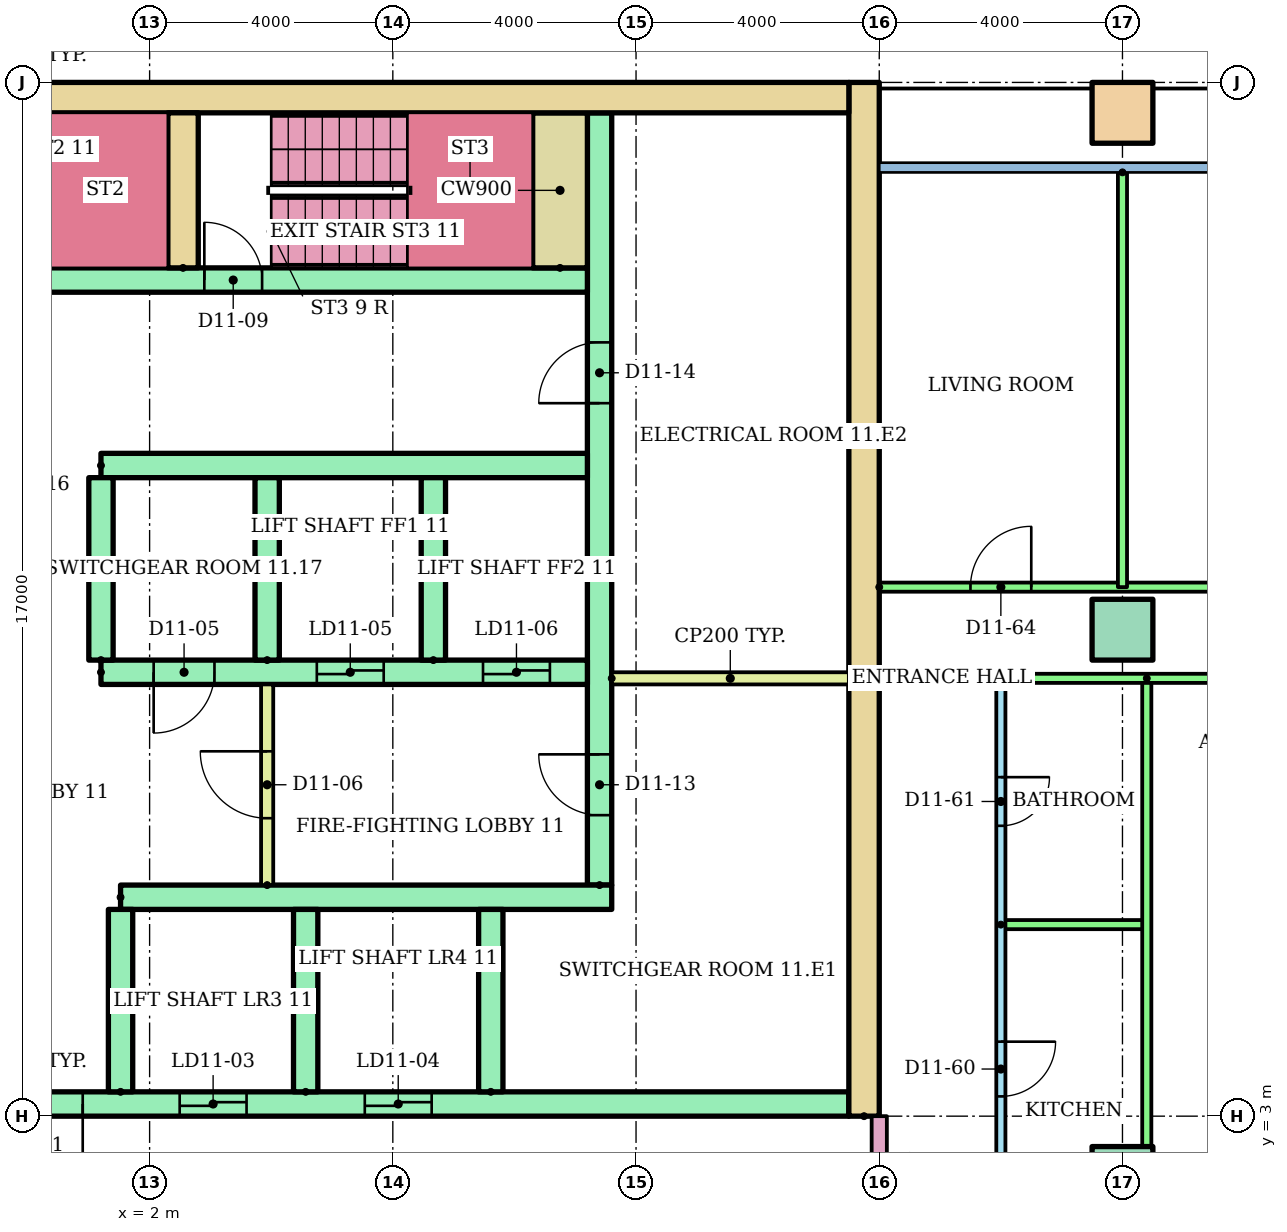
"""IFC4 building model, lengths in metres.
Left out: names, types, materials, properties, quantities, classifications, styles, units other than length and angle.
Written with IfcOpenShell. Run it as: python <this file> out.ifc"""

import sys

from ifc_helpers import new_model, si_unit, direction, frame, frame_2d, origin, origin_2d, place, context, subcontext, project, spatial, rectangle, hollow_rectangle, extrude, element, fill, save


model = new_model("IFC4")
c1 = context("Model", 3, precision=1e-05, world=origin(), true_north=direction((0.0, 1.0)))
c2 = subcontext(c1, "Body", "Model", "MODEL_VIEW")
j1 = project(units=[si_unit("LENGTHUNIT", "METRE"), si_unit("PLANEANGLEUNIT", "RADIAN")], contexts=[c1])
p1 = place(None, origin())
s1 = spatial("IfcSite", under=j1, at=p1, CompositionType="ELEMENT")
p2 = place(p1, origin())
s2 = spatial("IfcBuilding", under=s1, at=p2, CompositionType="ELEMENT")
p3 = place(p2, frame((0.0, 0.0, 44.8)))
s3 = spatial("IfcBuildingStorey", under=s2, at=p3, CompositionType="ELEMENT", Elevation=44.8)
for number, where in (
    (1, (18.0, 2.0, 0.0)),
    (2, (18.0, 11.0, 0.0)),
):
    element("IfcColumn", number, at=place(p3, frame(where)), inside=s3, PredefinedType="COLUMN", context=c2, shape_type="SweptSolid", body=[
        extrude(rectangle(XDim=1.0, YDim=1.0, at=origin_2d()), origin(), (0.0, 0.0, 1.0), 3.2),
    ])
p4 = place(p3, frame((18.0, 19.5, 0.0)))
e3 = element("IfcColumn", 3, at=p4, inside=s3, PredefinedType="COLUMN", context=c2, shape_type="SweptSolid", body=[
    extrude(hollow_rectangle(XDim=1.0, YDim=1.0, WallThickness=0.05, at=origin_2d()), origin(), (0.0, 0.0, 1.0), 3.2),
])
p5 = place(p3, frame((13.75, 3.0, 0.0), z_axis=(0.0, 0.0, 1.0), x_axis=(0.0, 1.0, 0.0)))
e4 = element("IfcWall", 4, at=p5, inside=s3, PredefinedType="SHEAR", context=c2, shape_type="SweptSolid", body=[
    extrude(rectangle(XDim=17.0, YDim=0.5, at=frame_2d((8.5, 0.0))), origin(), (0.0, 0.0, 1.0), 2.92),
])
p6 = place(p3, frame((-13.5, 19.75, 0.0)))
e5 = element("IfcWall", 5, at=p6, inside=s3, PredefinedType="SHEAR", context=c2, shape_type="SweptSolid", body=[
    extrude(rectangle(XDim=27.0, YDim=0.5, at=frame_2d((13.5, 0.0))), origin(), (0.0, 0.0, 1.0), 2.92),
])
p7 = place(p3, frame((9.4, 6.8, 0.0), z_axis=(0.0, 0.0, 1.0), x_axis=(0.0, 1.0, 0.0)))
e6 = element("IfcWall", 6, at=p7, inside=s3, PredefinedType="SHEAR", context=c2, shape_type="SweptSolid", body=[
    extrude(rectangle(XDim=12.7, YDim=0.4, at=frame_2d((6.35, 0.0))), origin(), (0.0, 0.0, 1.0), 2.92),
])
p8 = place(p7, frame((1.15, 0.0, 0.0)))
e7 = element("IfcOpeningElement", 7, at=p8, cuts=e6, PredefinedType="OPENING", context=c2, shape_type="SweptSolid", body=[
    extrude(rectangle(XDim=1.0, YDim=2.1, at=frame_2d((0.5, 1.05))), frame((0.0, 0.21, 0.0), z_axis=(0.0, -1.0, 0.0), x_axis=(1.0, 0.0, 0.0)), (0.0, 0.0, 1.0), 0.42),
])
p9 = place(p7, frame((7.925, 0.0, 0.0)))
e8 = element("IfcOpeningElement", 8, at=p9, cuts=e6, PredefinedType="OPENING", context=c2, shape_type="SweptSolid", body=[
    extrude(rectangle(XDim=1.0, YDim=2.1, at=frame_2d((0.5, 1.05))), frame((0.0, 0.21, 0.0), z_axis=(0.0, -1.0, 0.0), x_axis=(1.0, 0.0, 0.0)), (0.0, 0.0, 1.0), 0.42),
])
p10 = place(p3, frame((-13.5, 3.2, 0.0)))
e9 = element("IfcWall", 9, at=p10, inside=s3, PredefinedType="SHEAR", context=c2, shape_type="SweptSolid", body=[
    extrude(rectangle(XDim=27.0, YDim=0.4, at=frame_2d((13.5, 0.0))), origin(), (0.0, 0.0, 1.0), 2.92),
])
p11 = place(p10, frame((6.861, 0.0, 0.0)))
e10 = element("IfcOpeningElement", 10, at=p11, cuts=e9, PredefinedType="OPENING", context=c2, shape_type="SweptSolid", body=[
    extrude(rectangle(XDim=1.1, YDim=2.1, at=frame_2d((0.55, 1.05))), frame((0.0, 0.21, 0.0), z_axis=(0.0, -1.0, 0.0), x_axis=(1.0, 0.0, 0.0)), (0.0, 0.0, 1.0), 0.42),
])
p12 = place(p10, frame((9.906, 0.0, 0.0)))
e11 = element("IfcOpeningElement", 11, at=p12, cuts=e9, PredefinedType="OPENING", context=c2, shape_type="SweptSolid", body=[
    extrude(rectangle(XDim=1.1, YDim=2.1, at=frame_2d((0.55, 1.05))), frame((0.0, 0.21, 0.0), z_axis=(0.0, -1.0, 0.0), x_axis=(1.0, 0.0, 0.0)), (0.0, 0.0, 1.0), 0.42),
])
p13 = place(p10, frame((15.994, 0.0, 0.0)))
e12 = element("IfcOpeningElement", 12, at=p13, cuts=e9, PredefinedType="OPENING", context=c2, shape_type="SweptSolid", body=[
    extrude(rectangle(XDim=1.1, YDim=2.1, at=frame_2d((0.55, 1.05))), frame((0.0, 0.21, 0.0), z_axis=(0.0, -1.0, 0.0), x_axis=(1.0, 0.0, 0.0)), (0.0, 0.0, 1.0), 0.42),
])
p14 = place(p10, frame((19.039, 0.0, 0.0)))
e13 = element("IfcOpeningElement", 13, at=p14, cuts=e9, PredefinedType="OPENING", context=c2, shape_type="SweptSolid", body=[
    extrude(rectangle(XDim=1.1, YDim=2.1, at=frame_2d((0.55, 1.05))), frame((0.0, 0.21, 0.0), z_axis=(0.0, -1.0, 0.0), x_axis=(1.0, 0.0, 0.0)), (0.0, 0.0, 1.0), 0.42),
])
p15 = place(p10, frame((12.6, 0.0, 0.0)))
e14 = element("IfcOpeningElement", 14, at=p15, cuts=e9, PredefinedType="OPENING", context=c2, shape_type="SweptSolid", body=[
    extrude(rectangle(XDim=1.8, YDim=2.1, at=frame_2d((0.9, 1.05))), frame((0.0, 0.21, 0.0), z_axis=(0.0, -1.0, 0.0), x_axis=(1.0, 0.0, 0.0)), (0.0, 0.0, 1.0), 0.42),
])
p16 = place(p3, frame((1.522, 6.6, 0.0)))
e15 = element("IfcWall", 15, at=p16, inside=s3, PredefinedType="SHEAR", context=c2, shape_type="SweptSolid", body=[
    extrude(rectangle(XDim=8.078, YDim=0.4, at=frame_2d((4.039, 0.0))), origin(), (0.0, 0.0, 1.0), 2.92),
])
for number, where, z_axis, x_axis in (
    (16, (1.522, 3.4, 0.0), (0.0, 0.0, 1.0), (0.0, 1.0, 0.0)),
    (17, (4.567, 3.4, 0.0), (0.0, 0.0, 1.0), (0.0, 1.0, 0.0)),
    (18, (7.611, 3.4, 0.0), (0.0, 0.0, 1.0), (0.0, 1.0, 0.0)),
):
    element("IfcWall", number, at=place(p3, frame(where, z_axis=z_axis, x_axis=x_axis)), inside=s3, PredefinedType="SHEAR", context=c2, shape_type="SweptSolid", body=[
        extrude(rectangle(XDim=3.0, YDim=0.4, at=frame_2d((1.5, 0.0))), origin(), (0.0, 0.0, 1.0), 2.92),
    ])
p17 = place(p3, frame((1.2, 10.3, 0.0)))
e19 = element("IfcWall", 19, at=p17, inside=s3, PredefinedType="SHEAR", context=c2, shape_type="SweptSolid", body=[
    extrude(rectangle(XDim=8.0, YDim=0.4, at=frame_2d((4.0, 0.0))), origin(), (0.0, 0.0, 1.0), 2.92),
])
p18 = place(p17, frame((3.55, 0.0, 0.0)))
e20 = element("IfcOpeningElement", 20, at=p18, cuts=e19, PredefinedType="OPENING", context=c2, shape_type="SweptSolid", body=[
    extrude(rectangle(XDim=1.1, YDim=2.1, at=frame_2d((0.55, 1.05))), frame((0.0, 0.21, 0.0), z_axis=(0.0, -1.0, 0.0), x_axis=(1.0, 0.0, 0.0)), (0.0, 0.0, 1.0), 0.42),
])
p19 = place(p17, frame((6.283, 0.0, 0.0)))
e21 = element("IfcOpeningElement", 21, at=p19, cuts=e19, PredefinedType="OPENING", context=c2, shape_type="SweptSolid", body=[
    extrude(rectangle(XDim=1.1, YDim=2.1, at=frame_2d((0.55, 1.05))), frame((0.0, 0.21, 0.0), z_axis=(0.0, -1.0, 0.0), x_axis=(1.0, 0.0, 0.0)), (0.0, 0.0, 1.0), 0.42),
])
p20 = place(p17, frame((0.867, 0.0, 0.0)))
e22 = element("IfcOpeningElement", 22, at=p20, cuts=e19, PredefinedType="OPENING", context=c2, shape_type="SweptSolid", body=[
    extrude(rectangle(XDim=1.0, YDim=2.1, at=frame_2d((0.5, 1.05))), frame((0.0, 0.21, 0.0), z_axis=(0.0, -1.0, 0.0), x_axis=(1.0, 0.0, 0.0)), (0.0, 0.0, 1.0), 0.42),
])
p21 = place(p3, frame((1.2, 13.7, 0.0)))
e23 = element("IfcWall", 23, at=p21, inside=s3, PredefinedType="SHEAR", context=c2, shape_type="SweptSolid", body=[
    extrude(rectangle(XDim=8.0, YDim=0.4, at=frame_2d((4.0, 0.0))), origin(), (0.0, 0.0, 1.0), 2.92),
])
for number, where, z_axis, x_axis in (
    (24, (1.2, 10.5, 0.0), (0.0, 0.0, 1.0), (0.0, 1.0, 0.0)),
    (25, (3.933, 10.5, 0.0), (0.0, 0.0, 1.0), (0.0, 1.0, 0.0)),
    (26, (6.667, 10.5, 0.0), (0.0, 0.0, 1.0), (0.0, 1.0, 0.0)),
):
    element("IfcWall", number, at=place(p3, frame(where, z_axis=z_axis, x_axis=x_axis)), inside=s3, PredefinedType="SHEAR", context=c2, shape_type="SweptSolid", body=[
        extrude(rectangle(XDim=3.0, YDim=0.4, at=frame_2d((1.5, 0.0))), origin(), (0.0, 0.0, 1.0), 2.92),
    ])
p22 = place(p3, frame((3.933, 6.8, 0.0), z_axis=(0.0, 0.0, 1.0), x_axis=(0.0, 1.0, 0.0)))
e27 = element("IfcWall", 27, at=p22, inside=s3, PredefinedType="PARTITIONING", context=c2, shape_type="SweptSolid", body=[
    extrude(rectangle(XDim=3.3, YDim=0.2, at=frame_2d((1.65, 0.0))), origin(), (0.0, 0.0, 1.0), 2.92),
])
p23 = place(p22, frame((1.1, 0.0, 0.0)))
e28 = element("IfcOpeningElement", 28, at=p23, cuts=e27, PredefinedType="OPENING", context=c2, shape_type="SweptSolid", body=[
    extrude(rectangle(XDim=1.1, YDim=2.1, at=frame_2d((0.55, 1.05))), frame((0.0, 0.11, 0.0), z_axis=(0.0, -1.0, 0.0), x_axis=(1.0, 0.0, 0.0)), (0.0, 0.0, 1.0), 0.22),
])
p24 = place(p3, frame((-9.2, 16.75, 0.0)))
e29 = element("IfcWall", 29, at=p24, inside=s3, PredefinedType="SHEAR", context=c2, shape_type="SweptSolid", body=[
    extrude(rectangle(XDim=18.4, YDim=0.4, at=frame_2d((9.2, 0.0))), origin(), (0.0, 0.0, 1.0), 2.92),
])
p25 = place(p24, frame((0.1, 0.0, 0.0)))
e30 = element("IfcOpeningElement", 30, at=p25, cuts=e29, PredefinedType="OPENING", context=c2, shape_type="SweptSolid", body=[
    extrude(rectangle(XDim=0.95, YDim=2.1, at=frame_2d((0.475, 1.05))), frame((0.0, 0.21, 0.0), z_axis=(0.0, -1.0, 0.0), x_axis=(1.0, 0.0, 0.0)), (0.0, 0.0, 1.0), 0.42),
])
p26 = place(p24, frame((6.1, 0.0, 0.0)))
e31 = element("IfcOpeningElement", 31, at=p26, cuts=e29, PredefinedType="OPENING", context=c2, shape_type="SweptSolid", body=[
    extrude(rectangle(XDim=0.95, YDim=2.1, at=frame_2d((0.475, 1.05))), frame((0.0, 0.21, 0.0), z_axis=(0.0, -1.0, 0.0), x_axis=(1.0, 0.0, 0.0)), (0.0, 0.0, 1.0), 0.42),
])
p27 = place(p24, frame((12.1, 0.0, 0.0)))
e32 = element("IfcOpeningElement", 32, at=p27, cuts=e29, PredefinedType="OPENING", context=c2, shape_type="SweptSolid", body=[
    extrude(rectangle(XDim=0.95, YDim=2.1, at=frame_2d((0.475, 1.05))), frame((0.0, 0.21, 0.0), z_axis=(0.0, -1.0, 0.0), x_axis=(1.0, 0.0, 0.0)), (0.0, 0.0, 1.0), 0.42),
])
p28 = place(p3, frame((2.55, 16.95, 0.0), z_axis=(0.0, 0.0, 1.0), x_axis=(0.0, 1.0, 0.0)))
e33 = element("IfcWall", 33, at=p28, inside=s3, PredefinedType="SHEAR", context=c2, shape_type="SweptSolid", body=[
    extrude(rectangle(XDim=2.55, YDim=0.5, at=frame_2d((1.275, 0.0))), origin(), (0.0, 0.0, 1.0), 2.92),
])
p29 = place(p3, frame((8.75, 16.95, 0.0), z_axis=(0.0, 0.0, 1.0), x_axis=(0.0, 1.0, 0.0)))
e34 = element("IfcWall", 34, at=p29, inside=s3, PredefinedType="SHEAR", context=c2, shape_type="SweptSolid", body=[
    extrude(rectangle(XDim=2.55, YDim=0.9, at=frame_2d((1.275, 0.0))), origin(), (0.0, 0.0, 1.0), 2.92),
])
p30 = place(p3, frame((9.6, 10.2, 0.0)))
e35 = element("IfcWall", 35, at=p30, inside=s3, PredefinedType="PARTITIONING", context=c2, shape_type="SweptSolid", body=[
    extrude(rectangle(XDim=3.9, YDim=0.2, at=frame_2d((1.95, 0.0))), origin(), (0.0, 0.0, 1.0), 2.92),
])
p31 = place(p3, frame((16.0, 10.2, 0.0), z_axis=(0.0, 0.0, 1.0), x_axis=(0.0, -1.0, 0.0)))
e36 = element("IfcWall", 36, at=p31, inside=s3, PredefinedType="PARTITIONING", context=c2, shape_type="SweptSolid", body=[
    extrude(rectangle(XDim=8.8, YDim=0.15, at=frame_2d((4.4, 0.0))), origin(), (0.0, 0.0, 1.0), 2.4),
])
p32 = place(p31, frame((5.975, 0.0, 0.0)))
e37 = element("IfcOpeningElement", 37, at=p32, cuts=e36, PredefinedType="OPENING", context=c2, shape_type="SweptSolid", body=[
    extrude(rectangle(XDim=0.9, YDim=2.1, at=frame_2d((0.45, 1.05))), frame((0.0, 0.085, 0.0), z_axis=(0.0, -1.0, 0.0), x_axis=(1.0, 0.0, 0.0)), (0.0, 0.0, 1.0), 0.17),
])
p33 = place(p31, frame((1.625, 0.0, 0.0)))
e38 = element("IfcOpeningElement", 38, at=p33, cuts=e36, PredefinedType="OPENING", context=c2, shape_type="SweptSolid", body=[
    extrude(rectangle(XDim=0.8, YDim=2.1, at=frame_2d((0.4, 1.05))), frame((0.0, 0.085, 0.0), z_axis=(0.0, -1.0, 0.0), x_axis=(1.0, 0.0, 0.0)), (0.0, 0.0, 1.0), 0.17),
])
p34 = place(p3, frame((16.0, 6.15, 0.0)))
e39 = element("IfcWall", 39, at=p34, inside=s3, PredefinedType="PARTITIONING", context=c2, shape_type="SweptSolid", body=[
    extrude(rectangle(XDim=2.4, YDim=0.15, at=frame_2d((1.2, 0.0))), origin(), (0.0, 0.0, 1.0), 2.4),
])
p35 = place(p3, frame((18.4, 10.2, 0.0), z_axis=(0.0, 0.0, 1.0), x_axis=(0.0, -1.0, 0.0)))
e40 = element("IfcWall", 40, at=p35, inside=s3, PredefinedType="PARTITIONING", context=c2, shape_type="SweptSolid", body=[
    extrude(rectangle(XDim=8.8, YDim=0.15, at=frame_2d((4.4, 0.0))), origin(), (0.0, 0.0, 1.0), 2.4),
])
p36 = place(p3, frame((26.0, 10.2, 0.0), z_axis=(0.0, 0.0, 1.0), x_axis=(-1.0, 0.0, 0.0)))
e41 = element("IfcWall", 41, at=p36, inside=s3, PredefinedType="PARTITIONING", context=c2, shape_type="SweptSolid", body=[
    extrude(rectangle(XDim=10.0, YDim=0.15, at=frame_2d((5.0, 0.0))), origin(), (0.0, 0.0, 1.0), 2.4),
])
p37 = place(p36, frame((4.9, 0.0, 0.0)))
e42 = element("IfcOpeningElement", 42, at=p37, cuts=e41, PredefinedType="OPENING", context=c2, shape_type="SweptSolid", body=[
    extrude(rectangle(XDim=0.9, YDim=2.1, at=frame_2d((0.45, 1.05))), frame((0.0, 0.085, 0.0), z_axis=(0.0, -1.0, 0.0), x_axis=(1.0, 0.0, 0.0)), (0.0, 0.0, 1.0), 0.17),
])
p38 = place(p36, frame((1.1, 0.0, 0.0)))
e43 = element("IfcOpeningElement", 43, at=p38, cuts=e41, PredefinedType="OPENING", context=c2, shape_type="SweptSolid", body=[
    extrude(rectangle(XDim=0.9, YDim=2.1, at=frame_2d((0.45, 1.05))), frame((0.0, 0.085, 0.0), z_axis=(0.0, -1.0, 0.0), x_axis=(1.0, 0.0, 0.0)), (0.0, 0.0, 1.0), 0.17),
])
p39 = place(p3, frame((14.0, 11.7, 0.0)))
e44 = element("IfcWall", 44, at=p39, inside=s3, PredefinedType="PARTITIONING", context=c2, shape_type="SweptSolid", body=[
    extrude(rectangle(XDim=12.0, YDim=0.15, at=frame_2d((6.0, 0.0))), origin(), (0.0, 0.0, 1.0), 2.4),
])
p40 = place(p39, frame((1.5, 0.0, 0.0)))
e45 = element("IfcOpeningElement", 45, at=p40, cuts=e44, PredefinedType="OPENING", context=c2, shape_type="SweptSolid", body=[
    extrude(rectangle(XDim=1.0, YDim=2.1, at=frame_2d((0.5, 1.05))), frame((0.0, 0.085, 0.0), z_axis=(0.0, -1.0, 0.0), x_axis=(1.0, 0.0, 0.0)), (0.0, 0.0, 1.0), 0.17),
])
p41 = place(p39, frame((7.55, 0.0, 0.0)))
e46 = element("IfcOpeningElement", 46, at=p41, cuts=e44, PredefinedType="OPENING", context=c2, shape_type="SweptSolid", body=[
    extrude(rectangle(XDim=0.9, YDim=2.1, at=frame_2d((0.45, 1.05))), frame((0.0, 0.085, 0.0), z_axis=(0.0, -1.0, 0.0), x_axis=(1.0, 0.0, 0.0)), (0.0, 0.0, 1.0), 0.17),
])
p42 = place(p3, frame((18.0, 18.521, 0.0), z_axis=(0.0, 0.0, 1.0), x_axis=(0.0, -1.0, 0.0)))
e47 = element("IfcWall", 47, at=p42, inside=s3, PredefinedType="PARTITIONING", context=c2, shape_type="SweptSolid", body=[
    extrude(rectangle(XDim=6.821, YDim=0.15, at=frame_2d((3.411, 0.0))), origin(), (0.0, 0.0, 1.0), 2.4),
])
p43 = place(p3, frame((14.0, 1.4, 0.0), z_axis=(0.0, 0.0, 1.0), x_axis=(0.0, 1.0, 0.0)))
e48 = element("IfcWall", 48, at=p43, inside=s3, PredefinedType="PARTITIONING", context=c2, shape_type="SweptSolid", body=[
    extrude(rectangle(XDim=1.6, YDim=0.25, at=frame_2d((0.8, 0.0))), origin(), (0.0, 0.0, 1.0), 2.4),
])
p44 = place(p13, origin())
e49 = element("IfcDoor", 49, at=p44, inside=s3, OperationType="SLIDING_TO_LEFT", PredefinedType="DOOR", context=c2, shape_type="SweptSolid", body=[
    extrude(rectangle(XDim=1.1, YDim=2.1, at=frame_2d((0.55, 1.05))), frame((0.0, 0.025, 0.0), z_axis=(0.0, -1.0, 0.0), x_axis=(1.0, 0.0, 0.0)), (0.0, 0.0, 1.0), 0.05),
])
fill(e12, e49)
p45 = place(p14, origin())
e50 = element("IfcDoor", 50, at=p45, inside=s3, OperationType="SLIDING_TO_LEFT", PredefinedType="DOOR", context=c2, shape_type="SweptSolid", body=[
    extrude(rectangle(XDim=1.1, YDim=2.1, at=frame_2d((0.55, 1.05))), frame((0.0, 0.025, 0.0), z_axis=(0.0, -1.0, 0.0), x_axis=(1.0, 0.0, 0.0)), (0.0, 0.0, 1.0), 0.05),
])
fill(e13, e50)
p46 = place(p15, frame((1.8, 0.0, 0.0), z_axis=(0.0, 0.0, 1.0), x_axis=(-1.0, 0.0, 0.0)))
e51 = element("IfcDoor", 51, at=p46, inside=s3, OperationType="DOUBLE_DOOR_SINGLE_SWING", PredefinedType="DOOR", context=c2, shape_type="SweptSolid", body=[
    extrude(rectangle(XDim=1.8, YDim=2.1, at=frame_2d((0.9, 1.05))), frame((0.0, 0.025, 0.0), z_axis=(0.0, -1.0, 0.0), x_axis=(1.0, 0.0, 0.0)), (0.0, 0.0, 1.0), 0.05),
])
fill(e14, e51)
p47 = place(p18, origin())
e52 = element("IfcDoor", 52, at=p47, inside=s3, OperationType="SLIDING_TO_LEFT", PredefinedType="DOOR", context=c2, shape_type="SweptSolid", body=[
    extrude(rectangle(XDim=1.1, YDim=2.1, at=frame_2d((0.55, 1.05))), frame((0.0, 0.025, 0.0), z_axis=(0.0, -1.0, 0.0), x_axis=(1.0, 0.0, 0.0)), (0.0, 0.0, 1.0), 0.05),
])
fill(e20, e52)
p48 = place(p19, origin())
e53 = element("IfcDoor", 53, at=p48, inside=s3, OperationType="SLIDING_TO_LEFT", PredefinedType="DOOR", context=c2, shape_type="SweptSolid", body=[
    extrude(rectangle(XDim=1.1, YDim=2.1, at=frame_2d((0.55, 1.05))), frame((0.0, 0.025, 0.0), z_axis=(0.0, -1.0, 0.0), x_axis=(1.0, 0.0, 0.0)), (0.0, 0.0, 1.0), 0.05),
])
fill(e21, e53)
p49 = place(p20, frame((1.0, 0.0, 0.0), z_axis=(0.0, 0.0, 1.0), x_axis=(-1.0, 0.0, 0.0)))
e54 = element("IfcDoor", 54, at=p49, inside=s3, OperationType="SINGLE_SWING_LEFT", PredefinedType="DOOR", context=c2, shape_type="SweptSolid", body=[
    extrude(rectangle(XDim=1.0, YDim=2.1, at=frame_2d((0.5, 1.05))), frame((0.0, 0.025, 0.0), z_axis=(0.0, -1.0, 0.0), x_axis=(1.0, 0.0, 0.0)), (0.0, 0.0, 1.0), 0.05),
])
fill(e22, e54)
p50 = place(p23, origin())
e55 = element("IfcDoor", 55, at=p50, inside=s3, OperationType="SINGLE_SWING_RIGHT", PredefinedType="DOOR", context=c2, shape_type="SweptSolid", body=[
    extrude(rectangle(XDim=1.1, YDim=2.1, at=frame_2d((0.55, 1.05))), frame((0.0, 0.025, 0.0), z_axis=(0.0, -1.0, 0.0), x_axis=(1.0, 0.0, 0.0)), (0.0, 0.0, 1.0), 0.05),
])
fill(e28, e55)
p51 = place(p27, origin())
e56 = element("IfcDoor", 56, at=p51, inside=s3, OperationType="SINGLE_SWING_LEFT", PredefinedType="DOOR", context=c2, shape_type="SweptSolid", body=[
    extrude(rectangle(XDim=0.95, YDim=2.1, at=frame_2d((0.475, 1.05))), frame((0.0, 0.025, 0.0), z_axis=(0.0, -1.0, 0.0), x_axis=(1.0, 0.0, 0.0)), (0.0, 0.0, 1.0), 0.05),
])
fill(e32, e56)
p52 = place(p8, origin())
e57 = element("IfcDoor", 57, at=p52, inside=s3, OperationType="SINGLE_SWING_RIGHT", PredefinedType="DOOR", context=c2, shape_type="SweptSolid", body=[
    extrude(rectangle(XDim=1.0, YDim=2.1, at=frame_2d((0.5, 1.05))), frame((0.0, 0.025, 0.0), z_axis=(0.0, -1.0, 0.0), x_axis=(1.0, 0.0, 0.0)), (0.0, 0.0, 1.0), 0.05),
])
fill(e7, e57)
p53 = place(p9, origin())
e58 = element("IfcDoor", 58, at=p53, inside=s3, OperationType="SINGLE_SWING_LEFT", PredefinedType="DOOR", context=c2, shape_type="SweptSolid", body=[
    extrude(rectangle(XDim=1.0, YDim=2.1, at=frame_2d((0.5, 1.05))), frame((0.0, 0.025, 0.0), z_axis=(0.0, -1.0, 0.0), x_axis=(1.0, 0.0, 0.0)), (0.0, 0.0, 1.0), 0.05),
])
fill(e8, e58)
p54 = place(p32, origin())
e59 = element("IfcDoor", 59, at=p54, inside=s3, OperationType="SINGLE_SWING_LEFT", PredefinedType="DOOR", context=c2, shape_type="SweptSolid", body=[
    extrude(rectangle(XDim=0.9, YDim=2.1, at=frame_2d((0.45, 1.05))), frame((0.0, 0.025, 0.0), z_axis=(0.0, -1.0, 0.0), x_axis=(1.0, 0.0, 0.0)), (0.0, 0.0, 1.0), 0.05),
])
fill(e37, e59)
p55 = place(p33, origin())
e60 = element("IfcDoor", 60, at=p55, inside=s3, OperationType="SINGLE_SWING_LEFT", PredefinedType="DOOR", context=c2, shape_type="SweptSolid", body=[
    extrude(rectangle(XDim=0.8, YDim=2.1, at=frame_2d((0.4, 1.05))), frame((0.0, 0.025, 0.0), z_axis=(0.0, -1.0, 0.0), x_axis=(1.0, 0.0, 0.0)), (0.0, 0.0, 1.0), 0.05),
])
fill(e38, e60)
p56 = place(p40, origin())
e61 = element("IfcDoor", 61, at=p56, inside=s3, OperationType="SINGLE_SWING_RIGHT", PredefinedType="DOOR", context=c2, shape_type="SweptSolid", body=[
    extrude(rectangle(XDim=1.0, YDim=2.1, at=frame_2d((0.5, 1.05))), frame((0.0, 0.025, 0.0), z_axis=(0.0, -1.0, 0.0), x_axis=(1.0, 0.0, 0.0)), (0.0, 0.0, 1.0), 0.05),
])
fill(e45, e61)
save(model, sys.argv[1])
